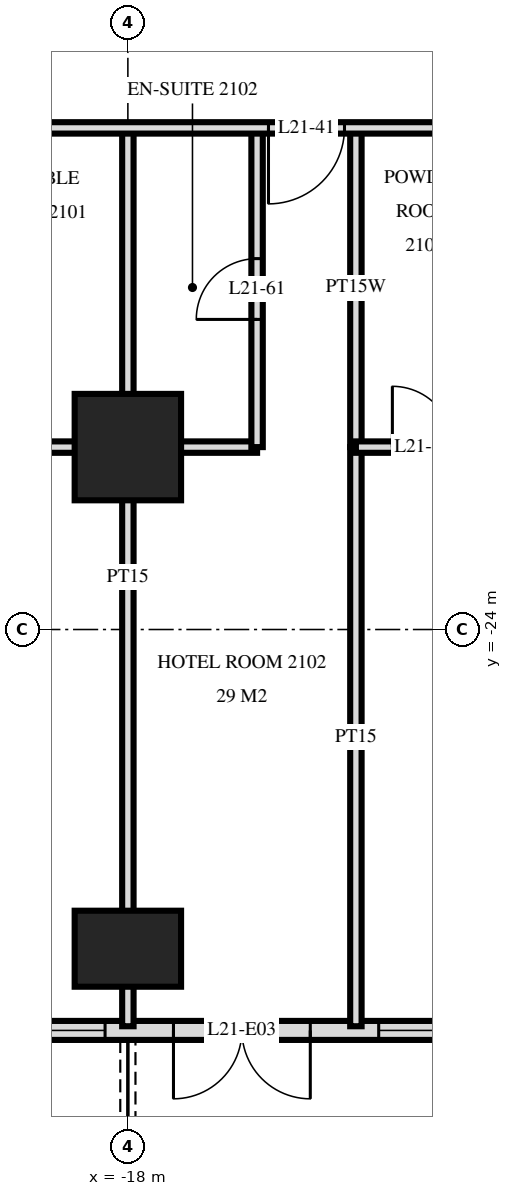
"""IFC4 building model, lengths in metres.
Left out: names, types, materials, properties, quantities, classifications, styles, units other than length and angle.
Written with IfcOpenShell. Run it as: python <this file> out.ifc"""

import sys

from ifc_helpers import new_model, si_unit, direction, frame, frame_2d, origin, origin_2d, place, context, subcontext, project, spatial, rectangle, extrude, element, fill, save


model = new_model("IFC4")
c1 = context("Model", 3, precision=1e-05, world=origin(), true_north=direction((0.0, 1.0)))
c2 = subcontext(c1, "Body", "Model", "MODEL_VIEW")
j1 = project(units=[si_unit("LENGTHUNIT", "METRE"), si_unit("PLANEANGLEUNIT", "RADIAN")], contexts=[c1])
p1 = place(None, origin())
s1 = spatial("IfcSite", under=j1, at=p1, CompositionType="ELEMENT")
p2 = place(p1, origin())
s2 = spatial("IfcBuilding", under=s1, at=p2, CompositionType="ELEMENT")
p3 = place(p2, frame((0.0, 0.0, 85.2)))
s3 = spatial("IfcBuildingStorey", under=s2, at=p3, CompositionType="ELEMENT", Elevation=85.2)
p4 = place(p3, frame((-18.0, -28.2, 0.0), z_axis=(0.0, 0.0, 1.0), x_axis=(1.0, 0.0, 0.0)))
e1 = element("IfcColumn", 1, at=p4, inside=s3, PredefinedType="COLUMN", context=c2, shape_type="SweptSolid", body=[
    extrude(rectangle(XDim=1.4, YDim=1.0, at=origin_2d()), origin(), (0.0, 0.0, 1.0), 3.6),
])
p5 = place(p3, frame((-18.0, -21.6, 0.0), z_axis=(0.0, 0.0, 1.0), x_axis=(1.0, 0.0, 0.0)))
e2 = element("IfcColumn", 2, at=p5, inside=s3, PredefinedType="COLUMN", context=c2, shape_type="SweptSolid", body=[
    extrude(rectangle(XDim=1.4, YDim=1.4, at=origin_2d()), origin(), (0.0, 0.0, 1.0), 3.6),
])
p6 = place(p3, frame((-28.775, -29.275, 0.0), z_axis=(0.0, 0.0, 1.0), x_axis=(1.0, 0.0, 0.0)))
e3 = element("IfcWall", 3, at=p6, inside=s3, PredefinedType="SOLIDWALL", context=c2, shape_type="SweptSolid", body=[
    extrude(rectangle(XDim=57.551, YDim=0.25, at=frame_2d((28.775, 0.0))), origin(), (0.0, 0.0, 1.0), 3.32),
])
p7 = place(p6, frame((0.575, 0.0, 0.0)))
e4 = element("IfcOpeningElement", 4, at=p7, cuts=e3, PredefinedType="OPENING", context=c2, shape_type="SweptSolid", body=[
    extrude(rectangle(XDim=1.8, YDim=2.4, at=frame_2d((0.9, 1.2))), frame((0.0, 0.135, 0.0), z_axis=(0.0, -1.0, 0.0), x_axis=(1.0, 0.0, 0.0)), (0.0, 0.0, 1.0), 0.27),
])
p8 = place(p6, frame((5.375, 0.0, 0.0)))
e5 = element("IfcOpeningElement", 5, at=p8, cuts=e3, PredefinedType="OPENING", context=c2, shape_type="SweptSolid", body=[
    extrude(rectangle(XDim=1.8, YDim=2.4, at=frame_2d((0.9, 1.2))), frame((0.0, 0.135, 0.0), z_axis=(0.0, -1.0, 0.0), x_axis=(1.0, 0.0, 0.0)), (0.0, 0.0, 1.0), 0.27),
])
p9 = place(p6, frame((8.075, 0.0, 0.3)))
e6 = element("IfcOpeningElement", 6, at=p9, cuts=e3, PredefinedType="OPENING", context=c2, shape_type="SweptSolid", body=[
    extrude(rectangle(XDim=2.4, YDim=2.1, at=frame_2d((1.2, 1.05))), frame((0.0, 0.135, 0.0), z_axis=(0.0, -1.0, 0.0), x_axis=(1.0, 0.0, 0.0)), (0.0, 0.0, 1.0), 0.27),
])
p10 = place(p6, frame((11.375, 0.0, 0.0)))
e7 = element("IfcOpeningElement", 7, at=p10, cuts=e3, PredefinedType="OPENING", context=c2, shape_type="SweptSolid", body=[
    extrude(rectangle(XDim=1.8, YDim=2.4, at=frame_2d((0.9, 1.2))), frame((0.0, 0.135, 0.0), z_axis=(0.0, -1.0, 0.0), x_axis=(1.0, 0.0, 0.0)), (0.0, 0.0, 1.0), 0.27),
])
p11 = place(p6, frame((14.075, 0.0, 0.3)))
e8 = element("IfcOpeningElement", 8, at=p11, cuts=e3, PredefinedType="OPENING", context=c2, shape_type="SweptSolid", body=[
    extrude(rectangle(XDim=2.4, YDim=2.1, at=frame_2d((1.2, 1.05))), frame((0.0, 0.135, 0.0), z_axis=(0.0, -1.0, 0.0), x_axis=(1.0, 0.0, 0.0)), (0.0, 0.0, 1.0), 0.27),
])
p12 = place(p6, frame((17.075, 0.0, 0.3)))
e9 = element("IfcOpeningElement", 9, at=p12, cuts=e3, PredefinedType="OPENING", context=c2, shape_type="SweptSolid", body=[
    extrude(rectangle(XDim=2.4, YDim=2.1, at=frame_2d((1.2, 1.05))), frame((0.0, 0.135, 0.0), z_axis=(0.0, -1.0, 0.0), x_axis=(1.0, 0.0, 0.0)), (0.0, 0.0, 1.0), 0.27),
])
p13 = place(p6, frame((20.375, 0.0, 0.0)))
e10 = element("IfcOpeningElement", 10, at=p13, cuts=e3, PredefinedType="OPENING", context=c2, shape_type="SweptSolid", body=[
    extrude(rectangle(XDim=1.8, YDim=2.4, at=frame_2d((0.9, 1.2))), frame((0.0, 0.135, 0.0), z_axis=(0.0, -1.0, 0.0), x_axis=(1.0, 0.0, 0.0)), (0.0, 0.0, 1.0), 0.27),
])
p14 = place(p6, frame((23.375, 0.0, 0.0)))
e11 = element("IfcOpeningElement", 11, at=p14, cuts=e3, PredefinedType="OPENING", context=c2, shape_type="SweptSolid", body=[
    extrude(rectangle(XDim=1.8, YDim=2.4, at=frame_2d((0.9, 1.2))), frame((0.0, 0.135, 0.0), z_axis=(0.0, -1.0, 0.0), x_axis=(1.0, 0.0, 0.0)), (0.0, 0.0, 1.0), 0.27),
])
p15 = place(p6, frame((26.075, 0.0, 0.3)))
e12 = element("IfcOpeningElement", 12, at=p15, cuts=e3, PredefinedType="OPENING", context=c2, shape_type="SweptSolid", body=[
    extrude(rectangle(XDim=2.4, YDim=2.1, at=frame_2d((1.2, 1.05))), frame((0.0, 0.135, 0.0), z_axis=(0.0, -1.0, 0.0), x_axis=(1.0, 0.0, 0.0)), (0.0, 0.0, 1.0), 0.27),
])
p16 = place(p6, frame((29.375, 0.0, 0.0)))
e13 = element("IfcOpeningElement", 13, at=p16, cuts=e3, PredefinedType="OPENING", context=c2, shape_type="SweptSolid", body=[
    extrude(rectangle(XDim=1.8, YDim=2.4, at=frame_2d((0.9, 1.2))), frame((0.0, 0.135, 0.0), z_axis=(0.0, -1.0, 0.0), x_axis=(1.0, 0.0, 0.0)), (0.0, 0.0, 1.0), 0.27),
])
p17 = place(p6, frame((32.075, 0.0, 0.3)))
e14 = element("IfcOpeningElement", 14, at=p17, cuts=e3, PredefinedType="OPENING", context=c2, shape_type="SweptSolid", body=[
    extrude(rectangle(XDim=2.4, YDim=2.1, at=frame_2d((1.2, 1.05))), frame((0.0, 0.135, 0.0), z_axis=(0.0, -1.0, 0.0), x_axis=(1.0, 0.0, 0.0)), (0.0, 0.0, 1.0), 0.27),
])
p18 = place(p6, frame((35.375, 0.0, 0.0)))
e15 = element("IfcOpeningElement", 15, at=p18, cuts=e3, PredefinedType="OPENING", context=c2, shape_type="SweptSolid", body=[
    extrude(rectangle(XDim=1.8, YDim=2.4, at=frame_2d((0.9, 1.2))), frame((0.0, 0.135, 0.0), z_axis=(0.0, -1.0, 0.0), x_axis=(1.0, 0.0, 0.0)), (0.0, 0.0, 1.0), 0.27),
])
p19 = place(p6, frame((38.075, 0.0, 0.3)))
e16 = element("IfcOpeningElement", 16, at=p19, cuts=e3, PredefinedType="OPENING", context=c2, shape_type="SweptSolid", body=[
    extrude(rectangle(XDim=2.4, YDim=2.1, at=frame_2d((1.2, 1.05))), frame((0.0, 0.135, 0.0), z_axis=(0.0, -1.0, 0.0), x_axis=(1.0, 0.0, 0.0)), (0.0, 0.0, 1.0), 0.27),
])
p20 = place(p6, frame((41.375, 0.0, 0.0)))
e17 = element("IfcOpeningElement", 17, at=p20, cuts=e3, PredefinedType="OPENING", context=c2, shape_type="SweptSolid", body=[
    extrude(rectangle(XDim=1.8, YDim=2.4, at=frame_2d((0.9, 1.2))), frame((0.0, 0.135, 0.0), z_axis=(0.0, -1.0, 0.0), x_axis=(1.0, 0.0, 0.0)), (0.0, 0.0, 1.0), 0.27),
])
p21 = place(p6, frame((44.075, 0.0, 0.3)))
e18 = element("IfcOpeningElement", 18, at=p21, cuts=e3, PredefinedType="OPENING", context=c2, shape_type="SweptSolid", body=[
    extrude(rectangle(XDim=2.4, YDim=2.1, at=frame_2d((1.2, 1.05))), frame((0.0, 0.135, 0.0), z_axis=(0.0, -1.0, 0.0), x_axis=(1.0, 0.0, 0.0)), (0.0, 0.0, 1.0), 0.27),
])
p22 = place(p6, frame((47.075, 0.0, 0.3)))
e19 = element("IfcOpeningElement", 19, at=p22, cuts=e3, PredefinedType="OPENING", context=c2, shape_type="SweptSolid", body=[
    extrude(rectangle(XDim=2.4, YDim=2.1, at=frame_2d((1.2, 1.05))), frame((0.0, 0.135, 0.0), z_axis=(0.0, -1.0, 0.0), x_axis=(1.0, 0.0, 0.0)), (0.0, 0.0, 1.0), 0.27),
])
p23 = place(p6, frame((50.375, 0.0, 0.0)))
e20 = element("IfcOpeningElement", 20, at=p23, cuts=e3, PredefinedType="OPENING", context=c2, shape_type="SweptSolid", body=[
    extrude(rectangle(XDim=1.8, YDim=2.4, at=frame_2d((0.9, 1.2))), frame((0.0, 0.135, 0.0), z_axis=(0.0, -1.0, 0.0), x_axis=(1.0, 0.0, 0.0)), (0.0, 0.0, 1.0), 0.27),
])
p24 = place(p6, frame((53.375, 0.0, 0.0)))
e21 = element("IfcOpeningElement", 21, at=p24, cuts=e3, PredefinedType="OPENING", context=c2, shape_type="SweptSolid", body=[
    extrude(rectangle(XDim=1.8, YDim=2.4, at=frame_2d((0.9, 1.2))), frame((0.0, 0.135, 0.0), z_axis=(0.0, -1.0, 0.0), x_axis=(1.0, 0.0, 0.0)), (0.0, 0.0, 1.0), 0.27),
])
p25 = place(p3, frame((-15.0, -29.22, 0.0), z_axis=(0.0, 0.0, 1.0), x_axis=(0.0, 1.0, 0.0)))
e22 = element("IfcWall", 22, at=p25, inside=s3, PredefinedType="PARTITIONING", context=c2, shape_type="SweptSolid", body=[
    extrude(rectangle(XDim=7.62, YDim=0.15, at=frame_2d((3.81, 0.0))), origin(), (0.0, 0.0, 1.0), 3.32),
])
p26 = place(p3, frame((-15.0, -21.6, 0.0), z_axis=(0.0, 0.0, 1.0), x_axis=(0.0, 1.0, 0.0)))
e23 = element("IfcWall", 23, at=p26, inside=s3, PredefinedType="PLUMBINGWALL", context=c2, shape_type="SweptSolid", body=[
    extrude(rectangle(XDim=4.2, YDim=0.15, at=frame_2d((2.1, 0.0))), origin(), (0.0, 0.0, 1.0), 3.32),
])
p27 = place(p3, frame((-16.3, -21.6, 0.0), z_axis=(0.0, 0.0, 1.0), x_axis=(0.0, 1.0, 0.0)))
e24 = element("IfcWall", 24, at=p27, inside=s3, PredefinedType="PARTITIONING", context=c2, shape_type="SweptSolid", body=[
    extrude(rectangle(XDim=4.2, YDim=0.15, at=frame_2d((2.1, 0.0))), origin(), (0.0, 0.0, 1.0), 3.32),
])
p28 = place(p27, frame((1.68, 0.0, 0.0)))
e25 = element("IfcOpeningElement", 25, at=p28, cuts=e24, PredefinedType="OPENING", context=c2, shape_type="SweptSolid", body=[
    extrude(rectangle(XDim=0.8, YDim=2.1, at=frame_2d((0.4, 1.05))), frame((0.0, 0.085, 0.0), z_axis=(0.0, -1.0, 0.0), x_axis=(1.0, 0.0, 0.0)), (0.0, 0.0, 1.0), 0.17),
])
p29 = place(p3, frame((-18.0, -29.22, 0.0), z_axis=(0.0, 0.0, 1.0), x_axis=(0.0, 1.0, 0.0)))
e26 = element("IfcWall", 26, at=p29, inside=s3, PredefinedType="PARTITIONING", context=c2, shape_type="SweptSolid", body=[
    extrude(rectangle(XDim=11.82, YDim=0.15, at=frame_2d((5.91, 0.0))), origin(), (0.0, 0.0, 1.0), 3.32),
])
p30 = place(p3, frame((-20.7, -21.6, 0.0), z_axis=(0.0, 0.0, 1.0), x_axis=(1.0, 0.0, 0.0)))
e27 = element("IfcWall", 27, at=p30, inside=s3, PredefinedType="PARTITIONING", context=c2, shape_type="SweptSolid", body=[
    extrude(rectangle(XDim=4.4, YDim=0.15, at=frame_2d((2.2, 0.0))), origin(), (0.0, 0.0, 1.0), 3.32),
])
p31 = place(p3, frame((-15.0, -21.6, 0.0), z_axis=(0.0, 0.0, 1.0), x_axis=(1.0, 0.0, 0.0)))
e28 = element("IfcWall", 28, at=p31, inside=s3, PredefinedType="PLUMBINGWALL", context=c2, shape_type="SweptSolid", body=[
    extrude(rectangle(XDim=1.8, YDim=0.15, at=frame_2d((0.9, 0.0))), origin(), (0.0, 0.0, 1.0), 3.32),
])
p32 = place(p31, frame((0.48, 0.0, 0.0)))
e29 = element("IfcOpeningElement", 29, at=p32, cuts=e28, PredefinedType="OPENING", context=c2, shape_type="SweptSolid", body=[
    extrude(rectangle(XDim=0.8, YDim=2.1, at=frame_2d((0.4, 1.05))), frame((0.0, 0.085, 0.0), z_axis=(0.0, -1.0, 0.0), x_axis=(1.0, 0.0, 0.0)), (0.0, 0.0, 1.0), 0.17),
])
p33 = place(p3, frame((-33.12, -17.4, 0.0), z_axis=(0.0, 0.0, 1.0), x_axis=(1.0, 0.0, 0.0)))
e30 = element("IfcWall", 30, at=p33, inside=s3, PredefinedType="PARTITIONING", context=c2, shape_type="SweptSolid", body=[
    extrude(rectangle(XDim=66.24, YDim=0.15, at=frame_2d((33.12, 0.0))), origin(), (0.0, 0.0, 1.0), 3.32),
])
p34 = place(p33, frame((10.27, 0.0, 0.0)))
e31 = element("IfcOpeningElement", 31, at=p34, cuts=e30, PredefinedType="OPENING", context=c2, shape_type="SweptSolid", body=[
    extrude(rectangle(XDim=1.0, YDim=2.1, at=frame_2d((0.5, 1.05))), frame((0.0, 0.085, 0.0), z_axis=(0.0, -1.0, 0.0), x_axis=(1.0, 0.0, 0.0)), (0.0, 0.0, 1.0), 0.17),
])
p35 = place(p33, frame((16.97, 0.0, 0.0)))
e32 = element("IfcOpeningElement", 32, at=p35, cuts=e30, PredefinedType="OPENING", context=c2, shape_type="SweptSolid", body=[
    extrude(rectangle(XDim=1.0, YDim=2.1, at=frame_2d((0.5, 1.05))), frame((0.0, 0.085, 0.0), z_axis=(0.0, -1.0, 0.0), x_axis=(1.0, 0.0, 0.0)), (0.0, 0.0, 1.0), 0.17),
])
p36 = place(p33, frame((28.42, 0.0, 0.0)))
e33 = element("IfcOpeningElement", 33, at=p36, cuts=e30, PredefinedType="OPENING", context=c2, shape_type="SweptSolid", body=[
    extrude(rectangle(XDim=1.0, YDim=2.1, at=frame_2d((0.5, 1.05))), frame((0.0, 0.085, 0.0), z_axis=(0.0, -1.0, 0.0), x_axis=(1.0, 0.0, 0.0)), (0.0, 0.0, 1.0), 0.17),
])
p37 = place(p33, frame((30.82, 0.0, 0.0)))
e34 = element("IfcOpeningElement", 34, at=p37, cuts=e30, PredefinedType="OPENING", context=c2, shape_type="SweptSolid", body=[
    extrude(rectangle(XDim=1.0, YDim=2.1, at=frame_2d((0.5, 1.05))), frame((0.0, 0.085, 0.0), z_axis=(0.0, -1.0, 0.0), x_axis=(1.0, 0.0, 0.0)), (0.0, 0.0, 1.0), 0.17),
])
p38 = place(p33, frame((39.27, 0.0, 0.0)))
e35 = element("IfcOpeningElement", 35, at=p38, cuts=e30, PredefinedType="OPENING", context=c2, shape_type="SweptSolid", body=[
    extrude(rectangle(XDim=1.0, YDim=2.1, at=frame_2d((0.5, 1.05))), frame((0.0, 0.085, 0.0), z_axis=(0.0, -1.0, 0.0), x_axis=(1.0, 0.0, 0.0)), (0.0, 0.0, 1.0), 0.17),
])
p39 = place(p33, frame((45.22, 0.0, 0.0)))
e36 = element("IfcOpeningElement", 36, at=p39, cuts=e30, PredefinedType="OPENING", context=c2, shape_type="SweptSolid", body=[
    extrude(rectangle(XDim=1.0, YDim=2.1, at=frame_2d((0.5, 1.05))), frame((0.0, 0.085, 0.0), z_axis=(0.0, -1.0, 0.0), x_axis=(1.0, 0.0, 0.0)), (0.0, 0.0, 1.0), 0.17),
])
p40 = place(p33, frame((48.27, 0.0, 0.0)))
e37 = element("IfcOpeningElement", 37, at=p40, cuts=e30, PredefinedType="OPENING", context=c2, shape_type="SweptSolid", body=[
    extrude(rectangle(XDim=1.0, YDim=2.1, at=frame_2d((0.5, 1.05))), frame((0.0, 0.085, 0.0), z_axis=(0.0, -1.0, 0.0), x_axis=(1.0, 0.0, 0.0)), (0.0, 0.0, 1.0), 0.17),
])
p41 = place(p33, frame((1.87, 0.0, 0.0)))
e38 = element("IfcOpeningElement", 38, at=p41, cuts=e30, PredefinedType="OPENING", context=c2, shape_type="SweptSolid", body=[
    extrude(rectangle(XDim=1.0, YDim=2.1, at=frame_2d((0.5, 1.05))), frame((0.0, 0.085, 0.0), z_axis=(0.0, -1.0, 0.0), x_axis=(1.0, 0.0, 0.0)), (0.0, 0.0, 1.0), 0.17),
])
p42 = place(p33, frame((60.37, 0.0, 0.0)))
e39 = element("IfcOpeningElement", 39, at=p42, cuts=e30, PredefinedType="OPENING", context=c2, shape_type="SweptSolid", body=[
    extrude(rectangle(XDim=1.0, YDim=2.1, at=frame_2d((0.5, 1.05))), frame((0.0, 0.085, 0.0), z_axis=(0.0, -1.0, 0.0), x_axis=(1.0, 0.0, 0.0)), (0.0, 0.0, 1.0), 0.17),
])
p43 = place(p9, origin())
e40 = element("IfcWindow", 40, at=p43, inside=s3, PartitioningType="SINGLE_PANEL", PredefinedType="WINDOW", context=c2, shape_type="SweptSolid", body=[
    extrude(rectangle(XDim=2.4, YDim=2.1, at=frame_2d((1.2, 1.05))), frame((0.0, 0.03, 0.0), z_axis=(0.0, -1.0, 0.0), x_axis=(1.0, 0.0, 0.0)), (0.0, 0.0, 1.0), 0.06),
])
fill(e6, e40)
p44 = place(p10, frame((0.9, 0.0, 0.0), z_axis=(0.0, 0.0, 1.0), x_axis=(-1.0, 0.0, 0.0)))
e41 = element("IfcDoor", 41, at=p44, inside=s3, OperationType="DOUBLE_DOOR_SINGLE_SWING", PredefinedType="DOOR", context=c2, shape_type="SweptSolid", body=[
    extrude(rectangle(XDim=1.8, YDim=2.4, at=frame_2d((0.0, 1.2))), frame((0.0, -0.025, 0.0), z_axis=(0.0, 1.0, 0.0), x_axis=(-1.0, 0.0, 0.0)), (0.0, 0.0, 1.0), 0.05),
])
fill(e7, e41)
p45 = place(p11, origin())
e42 = element("IfcWindow", 42, at=p45, inside=s3, PartitioningType="SINGLE_PANEL", PredefinedType="WINDOW", context=c2, shape_type="SweptSolid", body=[
    extrude(rectangle(XDim=2.4, YDim=2.1, at=frame_2d((1.2, 1.05))), frame((0.0, 0.03, 0.0), z_axis=(0.0, -1.0, 0.0), x_axis=(1.0, 0.0, 0.0)), (0.0, 0.0, 1.0), 0.06),
])
fill(e8, e42)
p46 = place(p35, frame((0.5, 0.0, 0.0), z_axis=(0.0, 0.0, 1.0), x_axis=(-1.0, 0.0, 0.0)))
e43 = element("IfcDoor", 43, at=p46, inside=s3, OperationType="SINGLE_SWING_LEFT", PredefinedType="DOOR", context=c2, shape_type="SweptSolid", body=[
    extrude(rectangle(XDim=1.0, YDim=2.1, at=frame_2d((0.0, 1.05))), frame((0.0, -0.025, 0.0), z_axis=(0.0, 1.0, 0.0), x_axis=(-1.0, 0.0, 0.0)), (0.0, 0.0, 1.0), 0.05),
])
fill(e32, e43)
p47 = place(p28, origin())
e44 = element("IfcDoor", 44, at=p47, inside=s3, OperationType="SINGLE_SWING_RIGHT", PredefinedType="DOOR", context=c2, shape_type="SweptSolid", body=[
    extrude(rectangle(XDim=0.8, YDim=2.1, at=frame_2d((0.4, 1.05))), frame((0.0, 0.025, 0.0), z_axis=(0.0, -1.0, 0.0), x_axis=(1.0, 0.0, 0.0)), (0.0, 0.0, 1.0), 0.05),
])
fill(e25, e44)
p48 = place(p32, origin())
e45 = element("IfcDoor", 45, at=p48, inside=s3, OperationType="SINGLE_SWING_RIGHT", PredefinedType="DOOR", context=c2, shape_type="SweptSolid", body=[
    extrude(rectangle(XDim=0.8, YDim=2.1, at=frame_2d((0.4, 1.05))), frame((0.0, 0.025, 0.0), z_axis=(0.0, -1.0, 0.0), x_axis=(1.0, 0.0, 0.0)), (0.0, 0.0, 1.0), 0.05),
])
fill(e29, e45)
save(model, sys.argv[1])
